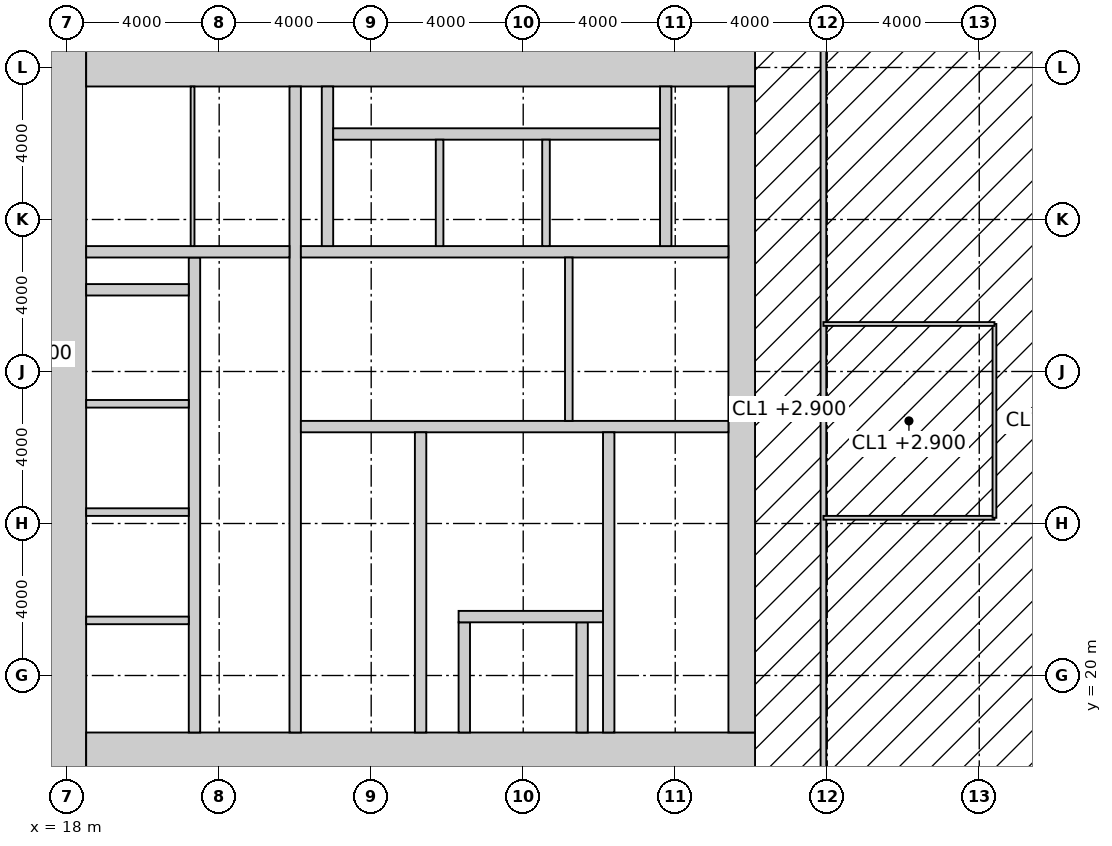
"""IFC4 building model, lengths in metres.
Left out: names, types, materials, properties, quantities, classifications, styles, units other than length and angle.
Written with IfcOpenShell. Run it as: python <this file> out.ifc"""

import sys

from ifc_helpers import new_model, si_unit, direction, frame, frame_2d, origin, place, context, subcontext, project, spatial, rectangle, extrude, element, fill, save


model = new_model("IFC4")
c1 = context("Model", 3, precision=1e-05, world=origin(), true_north=direction((0.0, 1.0)))
c2 = subcontext(c1, "Body", "Model", "MODEL_VIEW")
j1 = project(units=[si_unit("LENGTHUNIT", "METRE"), si_unit("PLANEANGLEUNIT", "RADIAN")], contexts=[c1])
p1 = place(None, origin())
s1 = spatial("IfcSite", under=j1, at=p1, CompositionType="ELEMENT")
p2 = place(p1, origin())
s2 = spatial("IfcBuilding", under=s1, at=p2, CompositionType="ELEMENT")
p3 = place(p2, frame((0.0, 0.0, 159.8)))
s3 = spatial("IfcBuildingStorey", under=s2, at=p3, CompositionType="ELEMENT", Elevation=159.8)
p4 = place(p3, frame((18.0, 17.5, -0.15), z_axis=(0.0, 0.0, 1.0), x_axis=(0.0, 1.0, 0.0)))
e1 = element("IfcWall", 1, at=p4, inside=s3, PredefinedType="SHEAR", context=c2, shape_type="SweptSolid", body=[
    extrude(rectangle(XDim=19.0, YDim=1.0, at=frame_2d((9.5, 0.0))), origin(), (0.0, 0.0, 1.0), 4.0),
])
p5 = place(p3, frame((18.5, 18.0, -0.15), z_axis=(0.0, 0.0, 1.0), x_axis=(1.0, 0.0, 0.0)))
e2 = element("IfcWall", 2, at=p5, inside=s3, PredefinedType="SHEAR", context=c2, shape_type="SweptSolid", body=[
    extrude(rectangle(XDim=17.6, YDim=1.0, at=frame_2d((8.8, 0.0))), origin(), (0.0, 0.0, 1.0), 4.0),
])
p6 = place(p5, frame((3.45, 0.0, 0.15)))
e3 = element("IfcOpeningElement", 3, at=p6, cuts=e2, PredefinedType="OPENING", context=c2, shape_type="SweptSolid", body=[
    extrude(rectangle(XDim=1.5, YDim=2.4, at=frame_2d((0.75, 1.2))), frame((0.0, 0.51, 0.0), z_axis=(0.0, -1.0, 0.0), x_axis=(1.0, 0.0, 0.0)), (0.0, 0.0, 1.0), 1.02),
])
p7 = place(p3, frame((18.5, 36.0, -0.15), z_axis=(0.0, 0.0, 1.0), x_axis=(1.0, 0.0, 0.0)))
e4 = element("IfcWall", 4, at=p7, inside=s3, PredefinedType="SHEAR", context=c2, shape_type="SweptSolid", body=[
    extrude(rectangle(XDim=17.6, YDim=1.0, at=frame_2d((8.8, 0.0))), origin(), (0.0, 0.0, 1.0), 4.0),
])
p8 = place(p3, frame((35.75, 18.5, -0.15), z_axis=(0.0, 0.0, 1.0), x_axis=(0.0, 1.0, 0.0)))
e5 = element("IfcWall", 5, at=p8, inside=s3, PredefinedType="SHEAR", context=c2, shape_type="SweptSolid", body=[
    extrude(rectangle(XDim=17.0, YDim=0.7, at=frame_2d((8.5, 0.0))), origin(), (0.0, 0.0, 1.0), 4.0),
])
p9 = place(p8, frame((9.85, 0.0, 0.15)))
e6 = element("IfcOpeningElement", 6, at=p9, cuts=e5, PredefinedType="OPENING", context=c2, shape_type="SweptSolid", body=[
    extrude(rectangle(XDim=1.0, YDim=2.2, at=frame_2d((0.5, 1.1))), frame((0.0, 0.36, 0.0), z_axis=(0.0, -1.0, 0.0), x_axis=(1.0, 0.0, 0.0)), (0.0, 0.0, 1.0), 0.72),
])
p10 = place(p3, frame((24.0, 18.5, -0.15), z_axis=(0.0, 0.0, 1.0), x_axis=(0.0, 1.0, 0.0)))
e7 = element("IfcWall", 7, at=p10, inside=s3, PredefinedType="SHEAR", context=c2, shape_type="SweptSolid", body=[
    extrude(rectangle(XDim=17.0, YDim=0.3, at=frame_2d((8.5, 0.0))), origin(), (0.0, 0.0, 1.0), 4.0),
])
p11 = place(p10, frame((9.6, 0.0, 0.15)))
e8 = element("IfcOpeningElement", 8, at=p11, cuts=e7, PredefinedType="OPENING", context=c2, shape_type="SweptSolid", body=[
    extrude(rectangle(XDim=1.5, YDim=2.4, at=frame_2d((0.75, 1.2))), frame((0.0, 0.16, 0.0), z_axis=(0.0, -1.0, 0.0), x_axis=(1.0, 0.0, 0.0)), (0.0, 0.0, 1.0), 0.32),
])
p12 = place(p3, frame((24.15, 26.55, -0.15), z_axis=(0.0, 0.0, 1.0), x_axis=(1.0, 0.0, 0.0)))
e9 = element("IfcWall", 9, at=p12, inside=s3, PredefinedType="SHEAR", context=c2, shape_type="SweptSolid", body=[
    extrude(rectangle(XDim=11.25, YDim=0.3, at=frame_2d((5.625, 0.0))), origin(), (0.0, 0.0, 1.0), 4.0),
])
p13 = place(p12, frame((9.25, 0.0, 0.15)))
e10 = element("IfcOpeningElement", 10, at=p13, cuts=e9, PredefinedType="OPENING", context=c2, shape_type="SweptSolid", body=[
    extrude(rectangle(XDim=1.0, YDim=2.2, at=frame_2d((0.5, 1.1))), frame((0.0, 0.16, 0.0), z_axis=(0.0, -1.0, 0.0), x_axis=(1.0, 0.0, 0.0)), (0.0, 0.0, 1.0), 0.32),
])
p14 = place(p12, frame((4.9, 0.0, 0.15)))
e11 = element("IfcOpeningElement", 11, at=p14, cuts=e9, PredefinedType="OPENING", context=c2, shape_type="SweptSolid", body=[
    extrude(rectangle(XDim=1.5, YDim=2.4, at=frame_2d((0.75, 1.2))), frame((0.0, 0.16, 0.0), z_axis=(0.0, -1.0, 0.0), x_axis=(1.0, 0.0, 0.0)), (0.0, 0.0, 1.0), 0.32),
])
p15 = place(p3, frame((27.3, 18.5, -0.15), z_axis=(0.0, 0.0, 1.0), x_axis=(0.0, 1.0, 0.0)))
e12 = element("IfcWall", 12, at=p15, inside=s3, PredefinedType="SHEAR", context=c2, shape_type="SweptSolid", body=[
    extrude(rectangle(XDim=7.9, YDim=0.3, at=frame_2d((3.95, 0.0))), origin(), (0.0, 0.0, 1.0), 4.0),
])
p16 = place(p15, frame((6.4, 0.0, 0.15)))
e13 = element("IfcOpeningElement", 13, at=p16, cuts=e12, PredefinedType="OPENING", context=c2, shape_type="SweptSolid", body=[
    extrude(rectangle(XDim=1.0, YDim=2.2, at=frame_2d((0.5, 1.1))), frame((0.0, 0.16, 0.0), z_axis=(0.0, -1.0, 0.0), x_axis=(1.0, 0.0, 0.0)), (0.0, 0.0, 1.0), 0.32),
])
p17 = place(p3, frame((32.25, 18.5, -0.15), z_axis=(0.0, 0.0, 1.0), x_axis=(0.0, 1.0, 0.0)))
e14 = element("IfcWall", 14, at=p17, inside=s3, PredefinedType="SHEAR", context=c2, shape_type="SweptSolid", body=[
    extrude(rectangle(XDim=7.9, YDim=0.3, at=frame_2d((3.95, 0.0))), origin(), (0.0, 0.0, 1.0), 4.0),
])
for number, where, z_axis, x_axis in (
    (15, (28.45, 18.5, -0.15), (0.0, 0.0, 1.0), (0.0, 1.0, 0.0)),
    (16, (31.55, 18.5, -0.15), (0.0, 0.0, 1.0), (0.0, 1.0, 0.0)),
):
    element("IfcWall", number, at=place(p3, frame(where, z_axis=z_axis, x_axis=x_axis)), inside=s3, PredefinedType="SHEAR", context=c2, shape_type="SweptSolid", body=[
        extrude(rectangle(XDim=2.9, YDim=0.3, at=frame_2d((1.45, 0.0))), origin(), (0.0, 0.0, 1.0), 4.0),
    ])
p18 = place(p3, frame((28.3, 21.55, -0.15), z_axis=(0.0, 0.0, 1.0), x_axis=(1.0, 0.0, 0.0)))
e17 = element("IfcWall", 17, at=p18, inside=s3, PredefinedType="SHEAR", context=c2, shape_type="SweptSolid", body=[
    extrude(rectangle(XDim=3.8, YDim=0.3, at=frame_2d((1.9, 0.0))), origin(), (0.0, 0.0, 1.0), 4.0),
])
p19 = place(p18, frame((1.05, 0.0, 0.15)))
e18 = element("IfcOpeningElement", 18, at=p19, cuts=e17, PredefinedType="OPENING", context=c2, shape_type="SweptSolid", body=[
    extrude(rectangle(XDim=1.3, YDim=2.4, at=frame_2d((0.65, 1.2))), frame((0.0, 0.16, 0.0), z_axis=(0.0, -1.0, 0.0), x_axis=(1.0, 0.0, 0.0)), (0.0, 0.0, 1.0), 0.32),
])
p20 = place(p3, frame((24.15, 31.15, -0.15), z_axis=(0.0, 0.0, 1.0), x_axis=(1.0, 0.0, 0.0)))
e19 = element("IfcWall", 19, at=p20, inside=s3, PredefinedType="SHEAR", context=c2, shape_type="SweptSolid", body=[
    extrude(rectangle(XDim=11.25, YDim=0.3, at=frame_2d((5.625, 0.0))), origin(), (0.0, 0.0, 1.0), 4.0),
])
p21 = place(p20, frame((7.25, 0.0, 0.15)))
e20 = element("IfcOpeningElement", 20, at=p21, cuts=e19, PredefinedType="OPENING", context=c2, shape_type="SweptSolid", body=[
    extrude(rectangle(XDim=1.4, YDim=2.4, at=frame_2d((0.7, 1.2))), frame((0.0, 0.16, 0.0), z_axis=(0.0, -1.0, 0.0), x_axis=(1.0, 0.0, 0.0)), (0.0, 0.0, 1.0), 0.32),
])
p22 = place(p3, frame((21.35, 18.5, -0.15), z_axis=(0.0, 0.0, 1.0), x_axis=(0.0, 1.0, 0.0)))
e21 = element("IfcWall", 21, at=p22, inside=s3, PredefinedType="SHEAR", context=c2, shape_type="SweptSolid", body=[
    extrude(rectangle(XDim=12.5, YDim=0.3, at=frame_2d((6.25, 0.0))), origin(), (0.0, 0.0, 1.0), 4.0),
])
p23 = place(p22, frame((0.875, 0.0, 0.15)))
e22 = element("IfcOpeningElement", 22, at=p23, cuts=e21, PredefinedType="OPENING", context=c2, shape_type="SweptSolid", body=[
    extrude(rectangle(XDim=1.1, YDim=2.2, at=frame_2d((0.55, 1.1))), frame((0.0, 0.16, 0.0), z_axis=(0.0, -1.0, 0.0), x_axis=(1.0, 0.0, 0.0)), (0.0, 0.0, 1.0), 0.32),
])
p24 = place(p22, frame((3.825, 0.0, 0.15)))
e23 = element("IfcOpeningElement", 23, at=p24, cuts=e21, PredefinedType="OPENING", context=c2, shape_type="SweptSolid", body=[
    extrude(rectangle(XDim=1.1, YDim=2.2, at=frame_2d((0.55, 1.1))), frame((0.0, 0.16, 0.0), z_axis=(0.0, -1.0, 0.0), x_axis=(1.0, 0.0, 0.0)), (0.0, 0.0, 1.0), 0.32),
])
p25 = place(p22, frame((6.675, 0.0, 0.15)))
e24 = element("IfcOpeningElement", 24, at=p25, cuts=e21, PredefinedType="OPENING", context=c2, shape_type="SweptSolid", body=[
    extrude(rectangle(XDim=1.1, YDim=2.2, at=frame_2d((0.55, 1.1))), frame((0.0, 0.16, 0.0), z_axis=(0.0, -1.0, 0.0), x_axis=(1.0, 0.0, 0.0)), (0.0, 0.0, 1.0), 0.32),
])
p26 = place(p22, frame((9.575, 0.0, 0.15)))
e25 = element("IfcOpeningElement", 25, at=p26, cuts=e21, PredefinedType="OPENING", context=c2, shape_type="SweptSolid", body=[
    extrude(rectangle(XDim=1.1, YDim=2.2, at=frame_2d((0.55, 1.1))), frame((0.0, 0.16, 0.0), z_axis=(0.0, -1.0, 0.0), x_axis=(1.0, 0.0, 0.0)), (0.0, 0.0, 1.0), 0.32),
])
p27 = place(p3, frame((18.5, 31.15, -0.15), z_axis=(0.0, 0.0, 1.0), x_axis=(1.0, 0.0, 0.0)))
e26 = element("IfcWall", 26, at=p27, inside=s3, PredefinedType="SHEAR", context=c2, shape_type="SweptSolid", body=[
    extrude(rectangle(XDim=5.35, YDim=0.3, at=frame_2d((2.675, 0.0))), origin(), (0.0, 0.0, 1.0), 4.0),
])
p28 = place(p27, frame((3.4, 0.0, 0.15)))
e27 = element("IfcOpeningElement", 27, at=p28, cuts=e26, PredefinedType="OPENING", context=c2, shape_type="SweptSolid", body=[
    extrude(rectangle(XDim=1.0, YDim=2.2, at=frame_2d((0.5, 1.1))), frame((0.0, 0.16, 0.0), z_axis=(0.0, -1.0, 0.0), x_axis=(1.0, 0.0, 0.0)), (0.0, 0.0, 1.0), 0.32),
])
p29 = place(p3, frame((18.5, 30.15, -0.15), z_axis=(0.0, 0.0, 1.0), x_axis=(1.0, 0.0, 0.0)))
e28 = element("IfcWall", 28, at=p29, inside=s3, PredefinedType="SHEAR", context=c2, shape_type="SweptSolid", body=[
    extrude(rectangle(XDim=2.7, YDim=0.3, at=frame_2d((1.35, 0.0))), origin(), (0.0, 0.0, 1.0), 4.0),
])
for number, where, z_axis, x_axis in (
    (29, (24.85, 31.3, -0.15), (0.0, 0.0, 1.0), (0.0, 1.0, 0.0)),
    (30, (33.75, 31.3, -0.15), (0.0, 0.0, 1.0), (0.0, 1.0, 0.0)),
):
    element("IfcWall", number, at=place(p3, frame(where, z_axis=z_axis, x_axis=x_axis)), inside=s3, PredefinedType="SHEAR", context=c2, shape_type="SweptSolid", body=[
        extrude(rectangle(XDim=4.2, YDim=0.3, at=frame_2d((2.1, 0.0))), origin(), (0.0, 0.0, 1.0), 4.0),
    ])
p30 = place(p3, frame((25.0, 34.25, -0.15), z_axis=(0.0, 0.0, 1.0), x_axis=(1.0, 0.0, 0.0)))
e31 = element("IfcWall", 31, at=p30, inside=s3, PredefinedType="SHEAR", context=c2, shape_type="SweptSolid", body=[
    extrude(rectangle(XDim=8.6, YDim=0.3, at=frame_2d((4.3, 0.0))), origin(), (0.0, 0.0, 1.0), 4.0),
])
for number, where, z_axis, x_axis in (
    (32, (27.8, 31.3, -0.15), (0.0, 0.0, 1.0), (0.0, 1.0, 0.0)),
    (33, (30.6, 31.3, -0.15), (0.0, 0.0, 1.0), (0.0, 1.0, 0.0)),
):
    element("IfcWall", number, at=place(p3, frame(where, z_axis=z_axis, x_axis=x_axis)), inside=s3, PredefinedType="SOLIDWALL", context=c2, shape_type="SweptSolid", body=[
        extrude(rectangle(XDim=2.8, YDim=0.2, at=frame_2d((1.4, 0.0))), origin(), (0.0, 0.0, 1.0), 4.0),
    ])
for number, where, z_axis, x_axis in (
    (34, (18.5, 21.45, -0.15), (0.0, 0.0, 1.0), (1.0, 0.0, 0.0)),
    (35, (18.5, 24.3, -0.15), (0.0, 0.0, 1.0), (1.0, 0.0, 0.0)),
    (36, (18.5, 27.15, -0.15), (0.0, 0.0, 1.0), (1.0, 0.0, 0.0)),
):
    element("IfcWall", number, at=place(p3, frame(where, z_axis=z_axis, x_axis=x_axis)), inside=s3, PredefinedType="SOLIDWALL", context=c2, shape_type="SweptSolid", body=[
        extrude(rectangle(XDim=2.7, YDim=0.2, at=frame_2d((1.35, 0.0))), origin(), (0.0, 0.0, 1.0), 4.0),
    ])
p31 = place(p3, frame((31.2, 26.7, 0.0), z_axis=(0.0, 0.0, 1.0), x_axis=(0.0, 1.0, 0.0)))
e37 = element("IfcWall", 37, at=p31, inside=s3, PredefinedType="SOLIDWALL", context=c2, shape_type="SweptSolid", body=[
    extrude(rectangle(XDim=4.3, YDim=0.2, at=frame_2d((2.15, 0.0))), origin(), (0.0, 0.0, 1.0), 3.85),
])
p32 = place(p3, frame((21.3, 31.3, 0.0), z_axis=(0.0, 0.0, 1.0), x_axis=(0.0, 1.0, 0.0)))
e38 = element("IfcWall", 38, at=p32, inside=s3, PredefinedType="PARTITIONING", context=c2, shape_type="SweptSolid", body=[
    extrude(rectangle(XDim=4.2, YDim=0.1, at=frame_2d((2.1, 0.0))), origin(), (0.0, 0.0, 1.0), 3.85),
])
p33 = place(p32, frame((1.55, 0.0, 0.0)))
e39 = element("IfcOpeningElement", 39, at=p33, cuts=e38, PredefinedType="OPENING", context=c2, shape_type="SweptSolid", body=[
    extrude(rectangle(XDim=1.0, YDim=2.2, at=frame_2d((0.5, 1.1))), frame((0.0, 0.06, 0.0), z_axis=(0.0, -1.0, 0.0), x_axis=(1.0, 0.0, 0.0)), (0.0, 0.0, 1.0), 0.12),
])
p34 = place(p3, frame((37.9, 15.025, 0.0), z_axis=(0.0, 0.0, 1.0), x_axis=(0.0, 1.0, 0.0)))
e40 = element("IfcWall", 40, at=p34, inside=s3, PredefinedType="PARTITIONING", context=c2, shape_type="SweptSolid", body=[
    extrude(rectangle(XDim=23.35, YDim=0.15, at=frame_2d((11.675, 0.0))), origin(), (0.0, 0.0, 1.0), 2.95),
])
p35 = place(p34, frame((10.775, 0.0, 0.0)))
e41 = element("IfcOpeningElement", 41, at=p35, cuts=e40, PredefinedType="OPENING", context=c2, shape_type="SweptSolid", body=[
    extrude(rectangle(XDim=1.8, YDim=2.4, at=frame_2d((0.9, 1.2))), frame((0.0, 0.085, 0.0), z_axis=(0.0, -1.0, 0.0), x_axis=(1.0, 0.0, 0.0)), (0.0, 0.0, 1.0), 0.17),
])
p36 = place(p3, frame((37.9, 24.15, 0.0), z_axis=(0.0, 0.0, 1.0), x_axis=(1.0, 0.0, 0.0)))
e42 = element("IfcWall", 42, at=p36, inside=s3, PredefinedType="PARTITIONING", context=c2, shape_type="SweptSolid", body=[
    extrude(rectangle(XDim=4.5, YDim=0.1, at=frame_2d((2.25, 0.0))), origin(), (0.0, 0.0, 1.0), 2.95),
])
p37 = place(p3, frame((42.4, 24.15, 0.0), z_axis=(0.0, 0.0, 1.0), x_axis=(0.0, 1.0, 0.0)))
e43 = element("IfcWall", 43, at=p37, inside=s3, PredefinedType="PARTITIONING", context=c2, shape_type="SweptSolid", body=[
    extrude(rectangle(XDim=5.1, YDim=0.1, at=frame_2d((2.55, 0.0))), origin(), (0.0, 0.0, 1.0), 3.85),
])
p38 = place(p37, frame((2.05, 0.0, 0.0)))
e44 = element("IfcOpeningElement", 44, at=p38, cuts=e43, PredefinedType="OPENING", context=c2, shape_type="SweptSolid", body=[
    extrude(rectangle(XDim=1.0, YDim=2.2, at=frame_2d((0.5, 1.1))), frame((0.0, 0.06, 0.0), z_axis=(0.0, -1.0, 0.0), x_axis=(1.0, 0.0, 0.0)), (0.0, 0.0, 1.0), 0.12),
])
p39 = place(p3, frame((42.4, 29.25, 0.0), z_axis=(0.0, 0.0, 1.0), x_axis=(-1.0, 0.0, 0.0)))
e45 = element("IfcWall", 45, at=p39, inside=s3, PredefinedType="PARTITIONING", context=c2, shape_type="SweptSolid", body=[
    extrude(rectangle(XDim=4.5, YDim=0.1, at=frame_2d((2.25, 0.0))), origin(), (0.0, 0.0, 1.0), 3.85),
])
p40 = place(p16, origin())
e46 = element("IfcDoor", 46, at=p40, inside=s3, OperationType="SINGLE_SWING_RIGHT", PredefinedType="DOOR", context=c2, shape_type="SweptSolid", body=[
    extrude(rectangle(XDim=1.0, YDim=2.2, at=frame_2d((0.5, 1.1))), frame((0.0, 0.025, 0.0), z_axis=(0.0, -1.0, 0.0), x_axis=(1.0, 0.0, 0.0)), (0.0, 0.0, 1.0), 0.05),
])
fill(e13, e46)
p41 = place(p13, frame((1.0, 0.0, 0.0), z_axis=(0.0, 0.0, 1.0), x_axis=(-1.0, 0.0, 0.0)))
e47 = element("IfcDoor", 47, at=p41, inside=s3, OperationType="SINGLE_SWING_RIGHT", PredefinedType="DOOR", context=c2, shape_type="SweptSolid", body=[
    extrude(rectangle(XDim=1.0, YDim=2.2, at=frame_2d((0.5, 1.1))), frame((0.0, 0.025, 0.0), z_axis=(0.0, -1.0, 0.0), x_axis=(1.0, 0.0, 0.0)), (0.0, 0.0, 1.0), 0.05),
])
fill(e10, e47)
p42 = place(p9, origin())
e48 = element("IfcDoor", 48, at=p42, inside=s3, OperationType="SINGLE_SWING_RIGHT", PredefinedType="DOOR", context=c2, shape_type="SweptSolid", body=[
    extrude(rectangle(XDim=1.0, YDim=2.2, at=frame_2d((0.5, 1.1))), frame((0.0, 0.025, 0.0), z_axis=(0.0, -1.0, 0.0), x_axis=(1.0, 0.0, 0.0)), (0.0, 0.0, 1.0), 0.05),
])
fill(e6, e48)
p43 = place(p14, origin())
e49 = element("IfcDoor", 49, at=p43, inside=s3, OperationType="DOUBLE_DOOR_DOUBLE_SWING", PredefinedType="DOOR", context=c2, shape_type="SweptSolid", body=[
    extrude(rectangle(XDim=1.5, YDim=2.4, at=frame_2d((0.75, 1.2))), frame((0.0, 0.025, 0.0), z_axis=(0.0, -1.0, 0.0), x_axis=(1.0, 0.0, 0.0)), (0.0, 0.0, 1.0), 0.05),
])
fill(e11, e49)
p44 = place(p11, origin())
e50 = element("IfcDoor", 50, at=p44, inside=s3, OperationType="DOUBLE_DOOR_DOUBLE_SWING", PredefinedType="DOOR", context=c2, shape_type="SweptSolid", body=[
    extrude(rectangle(XDim=1.5, YDim=2.4, at=frame_2d((0.75, 1.2))), frame((0.0, 0.025, 0.0), z_axis=(0.0, -1.0, 0.0), x_axis=(1.0, 0.0, 0.0)), (0.0, 0.0, 1.0), 0.05),
])
fill(e8, e50)
p45 = place(p28, origin())
e51 = element("IfcDoor", 51, at=p45, inside=s3, OperationType="SINGLE_SWING_LEFT", PredefinedType="DOOR", context=c2, shape_type="SweptSolid", body=[
    extrude(rectangle(XDim=1.0, YDim=2.2, at=frame_2d((0.5, 1.1))), frame((0.0, 0.025, 0.0), z_axis=(0.0, -1.0, 0.0), x_axis=(1.0, 0.0, 0.0)), (0.0, 0.0, 1.0), 0.05),
])
fill(e27, e51)
p46 = place(p33, origin())
e52 = element("IfcDoor", 52, at=p46, inside=s3, OperationType="SINGLE_SWING_LEFT", PredefinedType="DOOR", context=c2, shape_type="SweptSolid", body=[
    extrude(rectangle(XDim=1.0, YDim=2.2, at=frame_2d((0.5, 1.1))), frame((0.0, 0.025, 0.0), z_axis=(0.0, -1.0, 0.0), x_axis=(1.0, 0.0, 0.0)), (0.0, 0.0, 1.0), 0.05),
])
fill(e39, e52)
p47 = place(p6, origin())
e53 = element("IfcDoor", 53, at=p47, inside=s3, OperationType="DOUBLE_DOOR_DOUBLE_SWING", PredefinedType="DOOR", context=c2, shape_type="SweptSolid", body=[
    extrude(rectangle(XDim=1.5, YDim=2.4, at=frame_2d((0.75, 1.2))), frame((0.0, 0.025, 0.0), z_axis=(0.0, -1.0, 0.0), x_axis=(1.0, 0.0, 0.0)), (0.0, 0.0, 1.0), 0.05),
])
fill(e3, e53)
p48 = place(p35, origin())
e54 = element("IfcDoor", 54, at=p48, inside=s3, OperationType="DOUBLE_DOOR_DOUBLE_SWING", PredefinedType="DOOR", context=c2, shape_type="SweptSolid", body=[
    extrude(rectangle(XDim=1.8, YDim=2.4, at=frame_2d((0.9, 1.2))), frame((0.0, 0.025, 0.0), z_axis=(0.0, -1.0, 0.0), x_axis=(1.0, 0.0, 0.0)), (0.0, 0.0, 1.0), 0.05),
])
fill(e41, e54)
p49 = place(p38, origin())
e55 = element("IfcDoor", 55, at=p49, inside=s3, OperationType="SINGLE_SWING_RIGHT", PredefinedType="DOOR", context=c2, shape_type="SweptSolid", body=[
    extrude(rectangle(XDim=1.0, YDim=2.2, at=frame_2d((0.5, 1.1))), frame((0.0, 0.025, 0.0), z_axis=(0.0, -1.0, 0.0), x_axis=(1.0, 0.0, 0.0)), (0.0, 0.0, 1.0), 0.05),
])
fill(e44, e55)
p50 = place(p19, origin())
e56 = element("IfcDoor", 56, at=p50, inside=s3, OperationType="DOUBLE_DOOR_SLIDING", PredefinedType="DOOR", context=c2, shape_type="SweptSolid", body=[
    extrude(rectangle(XDim=1.3, YDim=2.4, at=frame_2d((0.65, 1.2))), frame((0.0, 0.025, 0.0), z_axis=(0.0, -1.0, 0.0), x_axis=(1.0, 0.0, 0.0)), (0.0, 0.0, 1.0), 0.05),
])
fill(e18, e56)
p51 = place(p21, origin())
e57 = element("IfcDoor", 57, at=p51, inside=s3, OperationType="DOUBLE_DOOR_SLIDING", PredefinedType="DOOR", context=c2, shape_type="SweptSolid", body=[
    extrude(rectangle(XDim=1.4, YDim=2.4, at=frame_2d((0.7, 1.2))), frame((0.0, 0.025, 0.0), z_axis=(0.0, -1.0, 0.0), x_axis=(1.0, 0.0, 0.0)), (0.0, 0.0, 1.0), 0.05),
])
fill(e20, e57)
p52 = place(p23, origin())
e58 = element("IfcDoor", 58, at=p52, inside=s3, OperationType="DOUBLE_DOOR_SLIDING", PredefinedType="DOOR", context=c2, shape_type="SweptSolid", body=[
    extrude(rectangle(XDim=1.1, YDim=2.2, at=frame_2d((0.55, 1.1))), frame((0.0, 0.025, 0.0), z_axis=(0.0, -1.0, 0.0), x_axis=(1.0, 0.0, 0.0)), (0.0, 0.0, 1.0), 0.05),
])
fill(e22, e58)
p53 = place(p24, origin())
e59 = element("IfcDoor", 59, at=p53, inside=s3, OperationType="DOUBLE_DOOR_SLIDING", PredefinedType="DOOR", context=c2, shape_type="SweptSolid", body=[
    extrude(rectangle(XDim=1.1, YDim=2.2, at=frame_2d((0.55, 1.1))), frame((0.0, 0.025, 0.0), z_axis=(0.0, -1.0, 0.0), x_axis=(1.0, 0.0, 0.0)), (0.0, 0.0, 1.0), 0.05),
])
fill(e23, e59)
p54 = place(p25, origin())
e60 = element("IfcDoor", 60, at=p54, inside=s3, OperationType="DOUBLE_DOOR_SLIDING", PredefinedType="DOOR", context=c2, shape_type="SweptSolid", body=[
    extrude(rectangle(XDim=1.1, YDim=2.2, at=frame_2d((0.55, 1.1))), frame((0.0, 0.025, 0.0), z_axis=(0.0, -1.0, 0.0), x_axis=(1.0, 0.0, 0.0)), (0.0, 0.0, 1.0), 0.05),
])
fill(e24, e60)
p55 = place(p26, origin())
e61 = element("IfcDoor", 61, at=p55, inside=s3, OperationType="DOUBLE_DOOR_SLIDING", PredefinedType="DOOR", context=c2, shape_type="SweptSolid", body=[
    extrude(rectangle(XDim=1.1, YDim=2.2, at=frame_2d((0.55, 1.1))), frame((0.0, 0.025, 0.0), z_axis=(0.0, -1.0, 0.0), x_axis=(1.0, 0.0, 0.0)), (0.0, 0.0, 1.0), 0.05),
])
fill(e25, e61)
save(model, sys.argv[1])
